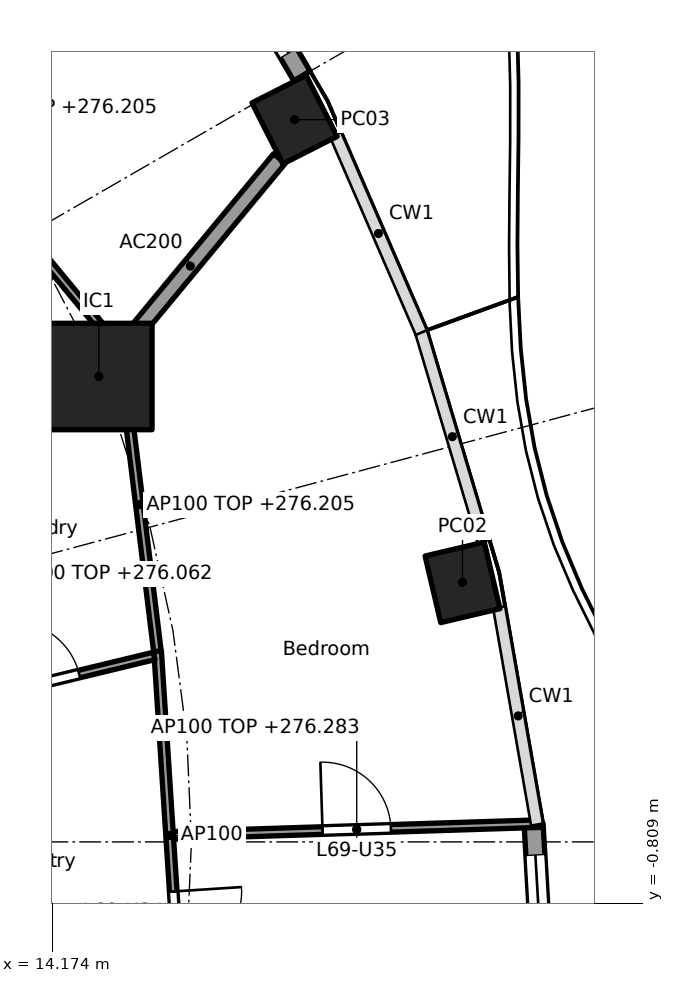
"""IFC4 building model, lengths in metres.
Left out: names, types, materials, properties, quantities, classifications, styles, units other than length and angle.
Written with IfcOpenShell. Run it as: python <this file> out.ifc"""

import sys

from ifc_helpers import new_model, si_unit, direction, frame, frame_2d, origin, origin_2d, place, context, subcontext, project, spatial, rectangle, hollow_rectangle, extrude, element, fill, save


model = new_model("IFC4")
c1 = context("Model", 3, precision=1e-05, world=origin(), true_north=direction((0.0, 1.0)))
c2 = subcontext(c1, "Body", "Model", "MODEL_VIEW")
j1 = project(units=[si_unit("LENGTHUNIT", "METRE"), si_unit("PLANEANGLEUNIT", "RADIAN")], contexts=[c1])
p1 = place(None, origin())
s1 = spatial("IfcSite", under=j1, at=p1, CompositionType="ELEMENT")
p2 = place(p1, origin())
s2 = spatial("IfcBuilding", under=s1, at=p2, CompositionType="ELEMENT")
p3 = place(p2, frame((0.0, 0.0, 273.3)))
s3 = spatial("IfcBuildingStorey", under=s2, at=p3, CompositionType="ELEMENT", Elevation=273.3)
for number, where, z_axis, x_axis in (
    (1, (19.566, 3.415, 0.0), (0.0, 0.0, 1.0), (-0.229, 0.973, 0.0)),
    (2, (17.356, 9.502, 0.0), (0.0, 0.0, 1.0), (-0.452, 0.892, 0.0)),
):
    element("IfcColumn", number, at=place(p3, frame(where, z_axis=z_axis, x_axis=x_axis)), inside=s3, PredefinedType="COLUMN", context=c2, shape_type="SweptSolid", body=[
        extrude(hollow_rectangle(XDim=0.9, YDim=0.8, WallThickness=0.028, at=origin_2d()), origin(), (0.0, 0.0, 1.0), 3.7),
    ])
p4 = place(p3, frame((14.782, 6.123, 0.0), z_axis=(0.0, 0.0, 1.0), x_axis=(1.0, 0.0, 0.0)))
e3 = element("IfcColumn", 3, at=p4, inside=s3, PredefinedType="COLUMN", context=c2, shape_type="SweptSolid", body=[
    extrude(rectangle(XDim=1.4, YDim=1.4, at=origin_2d()), origin(), (0.0, 0.0, 1.0), 3.7),
])
p5 = place(p3, frame((20.502, 0.235, 0.0), z_axis=(0.0, 0.0, 1.0), x_axis=(0.057533933376, -0.998343551344, 0.0)))
e4 = element("IfcWall", 4, at=p5, inside=s3, PredefinedType="SOLIDWALL", context=c2, shape_type="SweptSolid", body=[
    extrude(rectangle(XDim=2.915, YDim=0.25, at=frame_2d((1.458, 0.0))), origin(), (0.0, 0.0, 1.0), 3.44),
])
p6 = place(p5, frame((0.408, 0.0, 0.0)))
e5 = element("IfcOpeningElement", 5, at=p6, cuts=e4, PredefinedType="OPENING", context=c2, shape_type="SweptSolid", body=[
    extrude(rectangle(XDim=2.1, YDim=2.4, at=frame_2d((1.05, 1.2))), frame((0.0, 0.135, 0.0), z_axis=(0.0, -1.0, 0.0), x_axis=(1.0, 0.0, 0.0)), (0.0, 0.0, 1.0), 0.27),
])
p7 = place(p3, frame((16.038, 12.489, 0.0), z_axis=(0.0, 0.0, 1.0), x_axis=(0.506371364425, -0.862315511452, 0.0)))
e6 = element("IfcWall", 6, at=p7, inside=s3, PredefinedType="SOLIDWALL", context=c2, shape_type="SweptSolid", body=[
    extrude(rectangle(XDim=2.796, YDim=0.25, at=frame_2d((1.398, 0.0))), origin(), (0.0, 0.0, 1.0), 3.44),
])
p8 = place(p7, frame((0.348, 0.0, 0.0)))
e7 = element("IfcOpeningElement", 7, at=p8, cuts=e6, PredefinedType="OPENING", context=c2, shape_type="SweptSolid", body=[
    extrude(rectangle(XDim=2.1, YDim=2.4, at=frame_2d((1.05, 1.2))), frame((0.0, 0.135, 0.0), z_axis=(0.0, -1.0, 0.0), x_axis=(1.0, 0.0, 0.0)), (0.0, 0.0, 1.0), 0.27),
])
p9 = place(p3, frame((12.657, 5.243, 0.0), z_axis=(0.0, 0.0, 1.0), x_axis=(0.923853160736, 0.382747093259, 0.0)))
e8 = element("IfcWall", 8, at=p9, inside=s3, PredefinedType="PARTITIONING", context=c2, shape_type="SweptSolid", body=[
    extrude(rectangle(XDim=2.2, YDim=0.2, at=frame_2d((1.1, 0.0))), origin(), (0.0, 0.0, 1.0), 3.44),
])
p10 = place(p3, frame((14.814, 6.161, 0.0), z_axis=(0.0, 0.0, 1.0), x_axis=(0.638050520313, 0.769994502272, 0.0)))
e9 = element("IfcWall", 9, at=p10, inside=s3, PredefinedType="PARTITIONING", context=c2, shape_type="SweptSolid", body=[
    extrude(rectangle(XDim=3.673, YDim=0.2, at=frame_2d((1.836, 0.0))), origin(), (0.0, 0.0, 1.0), 3.44),
])
p11 = place(p3, frame((15.87, -2.338, 0.0), z_axis=(0.0, 0.0, 1.0), x_axis=(-0.064797294757, 0.997898447034, 0.0)))
e10 = element("IfcWall", 10, at=p11, inside=s3, PredefinedType="PARTITIONING", context=c2, shape_type="SweptSolid", body=[
    extrude(rectangle(XDim=4.857, YDim=0.1, at=frame_2d((2.428, 0.0))), origin(), (0.0, 0.0, 1.0), 3.44),
])
p12 = place(p11, frame((0.789, 0.0, 0.0)))
e11 = element("IfcOpeningElement", 11, at=p12, cuts=e10, PredefinedType="OPENING", context=c2, shape_type="SweptSolid", body=[
    extrude(rectangle(XDim=0.9, YDim=2.1, at=frame_2d((0.45, 1.05))), frame((0.0, 0.06, 0.0), z_axis=(0.0, -1.0, 0.0), x_axis=(1.0, 0.0, 0.0)), (0.0, 0.0, 1.0), 0.12),
])
p13 = place(p3, frame((15.763, 0.087, 0.0), z_axis=(0.0, 0.0, 1.0), x_axis=(0.999492034598, 0.03186962151, 0.0)))
e12 = element("IfcWall", 12, at=p13, inside=s3, PredefinedType="PARTITIONING", context=c2, shape_type="SweptSolid", body=[
    extrude(rectangle(XDim=4.826, YDim=0.1, at=frame_2d((2.413, 0.0))), origin(), (0.0, 0.0, 1.0), 2.983),
])
p14 = place(p13, frame((1.963, 0.0, 0.0)))
e13 = element("IfcOpeningElement", 13, at=p14, cuts=e12, PredefinedType="OPENING", context=c2, shape_type="SweptSolid", body=[
    extrude(rectangle(XDim=0.9, YDim=2.1, at=frame_2d((0.45, 1.05))), frame((0.0, 0.06, 0.0), z_axis=(0.0, -1.0, 0.0), x_axis=(1.0, 0.0, 0.0)), (0.0, 0.0, 1.0), 0.12),
])
p15 = place(p3, frame((12.662, 1.758, 0.0), z_axis=(0.0, 0.0, 1.0), x_axis=(0.972004827836, 0.234960879007, 0.0)))
e14 = element("IfcWall", 14, at=p15, inside=s3, PredefinedType="PARTITIONING", context=c2, shape_type="SweptSolid", body=[
    extrude(rectangle(XDim=2.93, YDim=0.1, at=frame_2d((1.465, 0.0))), origin(), (0.0, 0.0, 1.0), 2.762),
])
p16 = place(p15, frame((1.015, 0.0, 0.0)))
e15 = element("IfcOpeningElement", 15, at=p16, cuts=e14, PredefinedType="OPENING", context=c2, shape_type="SweptSolid", body=[
    extrude(rectangle(XDim=0.9, YDim=2.1, at=frame_2d((0.45, 1.05))), frame((0.0, 0.06, 0.0), z_axis=(0.0, -1.0, 0.0), x_axis=(1.0, 0.0, 0.0)), (0.0, 0.0, 1.0), 0.12),
])
p17 = place(p3, frame((15.552, 2.508, 0.0), z_axis=(0.0, 0.0, 1.0), x_axis=(-0.12196293976, 0.992534654974, 0.0)))
e16 = element("IfcWall", 16, at=p17, inside=s3, PredefinedType="PARTITIONING", context=c2, shape_type="SweptSolid", body=[
    extrude(rectangle(XDim=3.887, YDim=0.1, at=frame_2d((1.944, 0.0))), origin(), (0.0, 0.0, 1.0), 2.905),
])
p18 = place(p3, frame((15.002, 6.543, 0.0), z_axis=(0.0, 0.0, 1.0), x_axis=(-0.637932656528, 0.770092154054, 0.0)))
e17 = element("IfcWall", 17, at=p18, inside=s3, PredefinedType="PARTITIONING", context=c2, shape_type="SweptSolid", body=[
    extrude(rectangle(XDim=6.311, YDim=0.1, at=frame_2d((3.155, 0.0))), origin(), (0.0, 0.0, 1.0), 2.905),
])
p19 = place(p6, origin())
e18 = element("IfcDoor", 18, at=p19, inside=s3, OperationType="SLIDING_TO_LEFT", PredefinedType="DOOR", context=c2, shape_type="SweptSolid", body=[
    extrude(rectangle(XDim=2.1, YDim=2.4, at=frame_2d((1.05, 1.2))), frame((0.0, 0.025, 0.0), z_axis=(0.0, -1.0, 0.0), x_axis=(1.0, 0.0, 0.0)), (0.0, 0.0, 1.0), 0.05),
])
fill(e5, e18)
p20 = place(p8, origin())
e19 = element("IfcDoor", 19, at=p20, inside=s3, OperationType="SLIDING_TO_LEFT", PredefinedType="DOOR", context=c2, shape_type="SweptSolid", body=[
    extrude(rectangle(XDim=2.1, YDim=2.4, at=frame_2d((1.05, 1.2))), frame((0.0, 0.025, 0.0), z_axis=(0.0, -1.0, 0.0), x_axis=(1.0, 0.0, 0.0)), (0.0, 0.0, 1.0), 0.05),
])
fill(e7, e19)
p21 = place(p16, origin())
e20 = element("IfcDoor", 20, at=p21, inside=s3, OperationType="SINGLE_SWING_LEFT", PredefinedType="DOOR", context=c2, shape_type="SweptSolid", body=[
    extrude(rectangle(XDim=0.9, YDim=2.1, at=frame_2d((0.45, 1.05))), frame((0.0, 0.025, 0.0), z_axis=(0.0, -1.0, 0.0), x_axis=(1.0, 0.0, 0.0)), (0.0, 0.0, 1.0), 0.05),
])
fill(e15, e20)
p22 = place(p12, frame((0.9, 0.0, 0.0), x_axis=(-1.0, 0.0, 0.0)))
e21 = element("IfcDoor", 21, at=p22, inside=s3, OperationType="SINGLE_SWING_LEFT", PredefinedType="DOOR", context=c2, shape_type="SweptSolid", body=[
    extrude(rectangle(XDim=0.9, YDim=2.1, at=frame_2d((0.45, 1.05))), frame((0.0, 0.025, 0.0), z_axis=(0.0, -1.0, 0.0), x_axis=(1.0, 0.0, 0.0)), (0.0, 0.0, 1.0), 0.05),
])
fill(e11, e21)
p23 = place(p14, origin())
e22 = element("IfcDoor", 22, at=p23, inside=s3, OperationType="SINGLE_SWING_LEFT", PredefinedType="DOOR", context=c2, shape_type="SweptSolid", body=[
    extrude(rectangle(XDim=0.9, YDim=2.1, at=frame_2d((0.45, 1.05))), frame((0.0, 0.025, 0.0), z_axis=(0.0, -1.0, 0.0), x_axis=(1.0, 0.0, 0.0)), (0.0, 0.0, 1.0), 0.05),
])
fill(e13, e22)
save(model, sys.argv[1])
